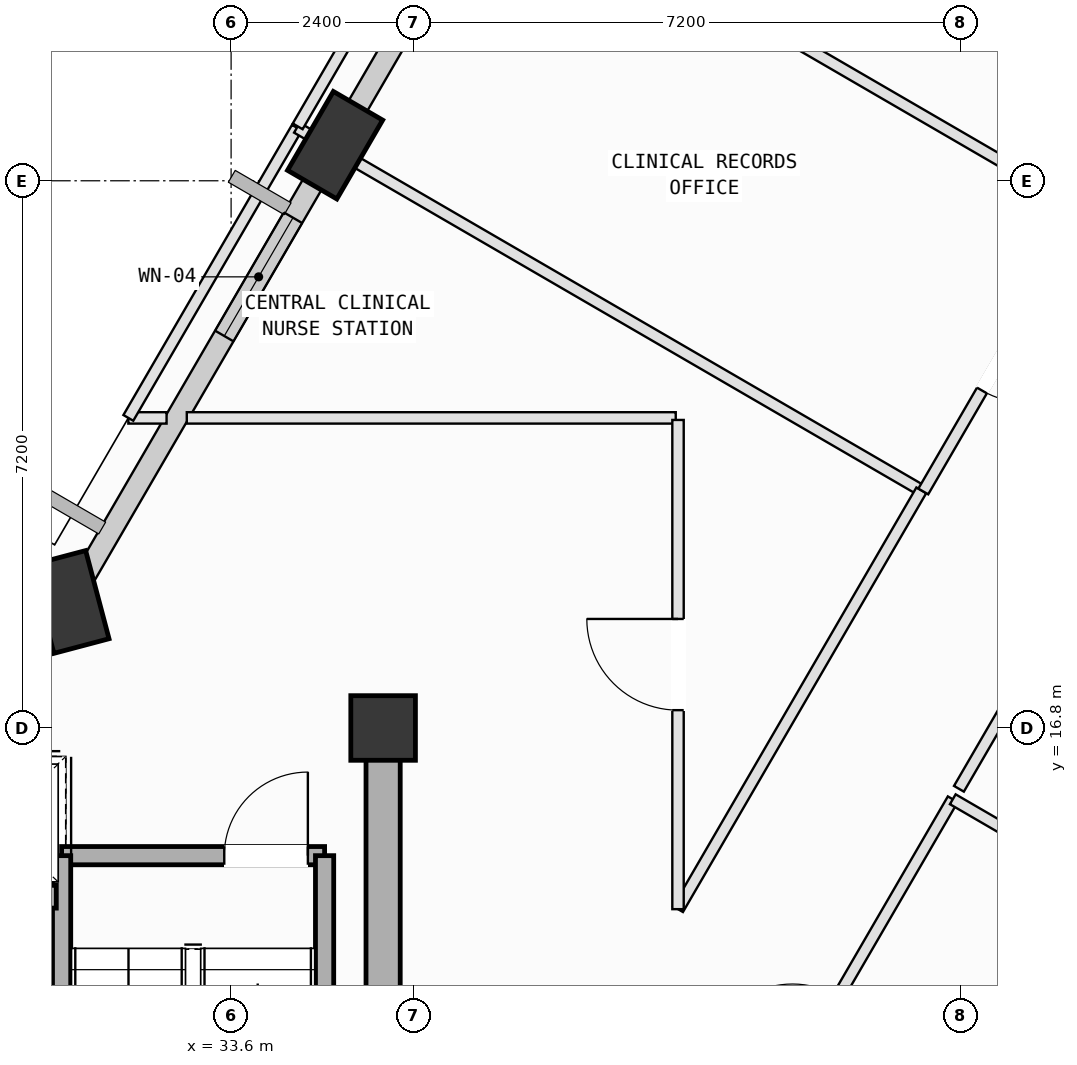
"""IFC4 building model, lengths in metres.
Left out: names, types, materials, properties, quantities, classifications, styles, units other than length and angle.
Written with IfcOpenShell. Run it as: python <this file> out.ifc"""

import sys

from ifc_helpers import new_model, si_unit, direction, frame, frame_2d, origin, origin_2d, place, context, subcontext, project, spatial, rectangle, extrude, element, fill, save


model = new_model("IFC4")
c1 = context("Model", 3, precision=1e-05, world=origin(), true_north=direction((0.0, 1.0)))
c2 = subcontext(c1, "Body", "Model", "MODEL_VIEW")
j1 = project(units=[si_unit("LENGTHUNIT", "METRE"), si_unit("PLANEANGLEUNIT", "RADIAN")], contexts=[c1])
p1 = place(None, origin())
s1 = spatial("IfcSite", under=j1, at=p1, CompositionType="ELEMENT")
p2 = place(p1, origin())
s2 = spatial("IfcBuilding", under=s1, at=p2, CompositionType="ELEMENT")
p3 = place(p2, frame((0.0, 0.0, 280.6)))
s3 = spatial("IfcBuildingStorey", under=s2, at=p3, CompositionType="ELEMENT", Elevation=280.6)
p4 = place(p3, frame((35.6, 16.8, 0.0), z_axis=(0.0, 0.0, 1.0), x_axis=(1.0, 0.0, 0.0)))
e1 = element("IfcColumn", 1, at=p4, inside=s3, PredefinedType="COLUMN", context=c2, shape_type="SweptSolid", body=[
    extrude(rectangle(XDim=0.85, YDim=0.85, at=origin_2d()), origin(), (0.0, 0.0, 1.0), 4.0),
])
p5 = place(p3, frame((34.968, 24.468, 0.002), z_axis=(0.001343981005, 0.005681374248, 0.999982957706), x_axis=(-0.687834203859, -0.725850275313, 0.005048349202)))
e2 = element("IfcColumn", 2, at=p5, inside=s3, PredefinedType="COLUMN", context=c2, shape_type="SweptSolid", body=[
    extrude(rectangle(XDim=1.2, YDim=0.75, at=origin_2d()), origin(), (0.0, 0.0, 1.0), 3.996),
])
p6 = place(p3, frame((31.478, 18.458, 0.002), z_axis=(0.026381199272, -0.008549462727, 0.999615395546), x_axis=(-0.99817719422, 0.0540716482, 0.026805704603)))
e3 = element("IfcColumn", 3, at=p6, inside=s3, PredefinedType="COLUMN", context=c2, shape_type="SweptSolid", body=[
    extrude(rectangle(XDim=1.2, YDim=0.75, at=origin_2d()), origin(), (0.0, 0.0, 1.0), 3.998),
])
p7 = place(p3, frame((35.174, 24.821, 0.0), z_axis=(0.0, 0.0, 1.0), x_axis=(0.502271513322, 0.864709966928, 0.0)))
e4 = element("IfcWall", 4, at=p7, inside=s3, PredefinedType="SOLIDWALL", context=c2, shape_type="SweptSolid", body=[
    extrude(rectangle(XDim=6.409, YDim=0.28, at=frame_2d((3.205, 0.0))), origin(), (0.0, 0.0, 1.0), 3.265),
])
p8 = place(p7, frame((1.101, 0.0, 0.75)))
e5 = element("IfcOpeningElement", 5, at=p8, cuts=e4, PredefinedType="OPENING", context=c2, shape_type="SweptSolid", body=[
    extrude(rectangle(XDim=1.4, YDim=1.85, at=frame_2d((0.7, 0.925))), frame((0.0, 0.15, 0.0), z_axis=(0.0, -1.0, 0.0), x_axis=(1.0, 0.0, 0.0)), (0.0, 0.0, 1.0), 0.3),
])
p9 = place(p3, frame((31.681, 18.809, 0.0), z_axis=(0.0, 0.0, 1.0), x_axis=(0.50225314976, 0.864720633243, 0.0)))
e6 = element("IfcWall", 6, at=p9, inside=s3, PredefinedType="SOLIDWALL", context=c2, shape_type="SweptSolid", body=[
    extrude(rectangle(XDim=6.158, YDim=0.28, at=frame_2d((3.079, 0.0))), origin(), (0.0, 0.0, 1.0), 3.265),
])
p10 = place(p9, frame((3.642, 0.0, 0.75)))
e7 = element("IfcOpeningElement", 7, at=p10, cuts=e6, PredefinedType="OPENING", context=c2, shape_type="SweptSolid", body=[
    extrude(rectangle(XDim=1.8, YDim=2.05, at=frame_2d((0.9, 1.025))), frame((0.0, 0.15, 0.0), z_axis=(0.0, -1.0, 0.0), x_axis=(1.0, 0.0, 0.0)), (0.0, 0.0, 1.0), 0.3),
])
p11 = place(p3, frame((25.164, 22.125, 0.0), z_axis=(0.0, 0.0, 1.0), x_axis=(0.864712756105, -0.502266711448, 0.0)))
e8 = element("IfcWall", 8, at=p11, inside=s3, PredefinedType="SOLIDWALL", context=c2, shape_type="SweptSolid", body=[
    extrude(rectangle(XDim=6.958, YDim=0.28, at=frame_2d((3.479, 0.0))), origin(), (0.0, 0.0, 1.0), 3.165),
])
p12 = place(p3, frame((31.37, 15.12, 0.0), z_axis=(0.0, 0.0, 1.0), x_axis=(1.0, 0.0, 0.0)))
e9 = element("IfcWall", 9, at=p12, inside=s3, PredefinedType="SOLIDWALL", context=c2, shape_type="SweptSolid", body=[
    extrude(rectangle(XDim=3.46, YDim=0.24, at=frame_2d((1.73, 0.0))), origin(), (0.0, 0.0, 1.0), 3.78),
])
p13 = place(p12, frame((2.14, 0.0, 0.0)))
e10 = element("IfcOpeningElement", 10, at=p13, cuts=e9, PredefinedType="OPENING", context=c2, shape_type="SweptSolid", body=[
    extrude(rectangle(XDim=1.1, YDim=2.15, at=frame_2d((0.55, 1.075))), frame((0.0, 0.13, 0.0), z_axis=(0.0, -1.0, 0.0), x_axis=(1.0, 0.0, 0.0)), (0.0, 0.0, 1.0), 0.26),
])
for number, where, z_axis, x_axis in (
    (11, (34.83, 15.12, 0.0), (0.0, 0.0, 1.0), (0.0, -1.0, 0.0)),
    (12, (31.37, 8.025, 0.0), (0.0, 0.0, 1.0), (0.0, 1.0, 0.0)),
):
    element("IfcWall", number, at=place(p3, frame(where, z_axis=z_axis, x_axis=x_axis)), inside=s3, PredefinedType="SOLIDWALL", context=c2, shape_type="SweptSolid", body=[
        extrude(rectangle(XDim=7.095, YDim=0.24, at=frame_2d((3.548, 0.0))), origin(), (0.0, 0.0, 1.0), 3.78),
    ])
p14 = place(p3, frame((35.6, 7.8, 0.0), z_axis=(0.0, 0.0, 1.0), x_axis=(0.0, 1.0, 0.0)))
e13 = element("IfcWall", 13, at=p14, inside=s3, PredefinedType="SHEAR", context=c2, shape_type="SweptSolid", body=[
    extrude(rectangle(XDim=9.0, YDim=0.45, at=frame_2d((4.5, 0.0))), origin(), (0.0, 0.0, 1.0), 3.78),
])
p15 = place(p3, frame((29.6, 14.58, 0.0), z_axis=(0.0, 0.0, 1.0), x_axis=(1.0, 0.0, 0.0)))
e14 = element("IfcWall", 14, at=p15, inside=s3, PredefinedType="SOLIDWALL", context=c2, shape_type="SweptSolid", body=[
    extrude(rectangle(XDim=1.7, YDim=0.3, at=frame_2d((0.85, 0.0))), origin(), (0.0, 0.0, 1.0), 3.78),
])
p16 = place(p15, frame((0.34, 0.0, 0.0)))
e15 = element("IfcOpeningElement", 15, at=p16, cuts=e14, PredefinedType="OPENING", context=c2, shape_type="SweptSolid", body=[
    extrude(rectangle(XDim=1.12, YDim=2.15, at=frame_2d((0.56, 1.075))), frame((0.0, 0.16, 0.0), z_axis=(0.0, -1.0, 0.0), x_axis=(1.0, 0.0, 0.0)), (0.0, 0.0, 1.0), 0.32),
])
p17 = place(p3, frame((39.48, 9.638, 0.0), z_axis=(0.0, 0.0, 1.0), x_axis=(0.502237798626, 0.864729549415, 0.0)))
e16 = element("IfcWall", 16, at=p17, inside=s3, PredefinedType="PARTITIONING", context=c2, shape_type="SweptSolid", body=[
    extrude(rectangle(XDim=7.198, YDim=0.15, at=frame_2d((3.599, 0.0))), origin(), (0.0, 0.0, 1.0), 3.78),
])
p18 = place(p17, frame((2.999, 0.0, 0.0)))
e17 = element("IfcOpeningElement", 17, at=p18, cuts=e16, PredefinedType="OPENING", context=c2, shape_type="SweptSolid", body=[
    extrude(rectangle(XDim=1.2, YDim=2.15, at=frame_2d((0.6, 1.075))), frame((0.0, 0.085, 0.0), z_axis=(0.0, -1.0, 0.0), x_axis=(1.0, 0.0, 0.0)), (0.0, 0.0, 1.0), 0.17),
])
p19 = place(p3, frame((43.095, 15.862, 0.0), z_axis=(0.0, 0.0, 1.0), x_axis=(0.864729577588, -0.502237750119, 0.0)))
e18 = element("IfcWall", 18, at=p19, inside=s3, PredefinedType="PARTITIONING", context=c2, shape_type="SweptSolid", body=[
    extrude(rectangle(XDim=9.448, YDim=0.15, at=frame_2d((4.724, 0.0))), origin(), (0.0, 0.0, 1.0), 3.78),
])
p20 = place(p3, frame((43.176, 16.0, 0.0), z_axis=(0.0, 0.0, 1.0), x_axis=(0.502223094905, 0.864738089218, 0.0)))
e19 = element("IfcWall", 19, at=p20, inside=s3, PredefinedType="PARTITIONING", context=c2, shape_type="SweptSolid", body=[
    extrude(rectangle(XDim=12.24, YDim=0.15, at=frame_2d((6.12, 0.0))), origin(), (0.0, 0.0, 1.0), 3.415),
])
p21 = place(p20, frame((5.52, 0.0, 0.0)))
e20 = element("IfcOpeningElement", 20, at=p21, cuts=e19, PredefinedType="OPENING", context=c2, shape_type="SweptSolid", body=[
    extrude(rectangle(XDim=1.2, YDim=2.15, at=frame_2d((0.6, 1.075))), frame((0.0, 0.085, 0.0), z_axis=(0.0, -1.0, 0.0), x_axis=(1.0, 0.0, 0.0)), (0.0, 0.0, 1.0), 0.17),
])
p22 = place(p3, frame((39.45, 20.88, 0.0), z_axis=(0.0, 0.0, 1.0), x_axis=(-1.0, 0.0, 0.0)))
e21 = element("IfcWall", 21, at=p22, inside=s3, PredefinedType="PARTITIONING", context=c2, shape_type="SweptSolid", body=[
    extrude(rectangle(XDim=6.433, YDim=0.15, at=frame_2d((3.216, 0.0))), origin(), (0.0, 0.0, 1.0), 3.415),
])
p23 = place(p3, frame((32.751, 20.88, 0.0), z_axis=(0.0, 0.0, 1.0), x_axis=(-1.0, 0.0, 0.0)))
e22 = element("IfcWall", 22, at=p23, inside=s3, PredefinedType="PARTITIONING", context=c2, shape_type="SweptSolid", body=[
    extrude(rectangle(XDim=0.503, YDim=0.15, at=frame_2d((0.251, 0.0))), origin(), (0.0, 0.0, 1.0), 3.78),
])
p24 = place(p3, frame((32.248, 20.88, 0.0), z_axis=(0.0, 0.0, 1.0), x_axis=(0.502312909272, 0.864685920539, 0.0)))
e23 = element("IfcWall", 23, at=p24, inside=s3, PredefinedType="PARTITIONING", context=c2, shape_type="SweptSolid", body=[
    extrude(rectangle(XDim=4.416, YDim=0.15, at=frame_2d((2.208, 0.0))), origin(), (0.0, 0.0, 1.0), 3.78),
])
p25 = place(p3, frame((34.466, 24.698, 0.0), z_axis=(0.0, 0.0, 1.0), x_axis=(0.864739263201, -0.50222107351, 0.0)))
e24 = element("IfcWall", 24, at=p25, inside=s3, PredefinedType="PARTITIONING", context=c2, shape_type="SweptSolid", body=[
    extrude(rectangle(XDim=9.5, YDim=0.15, at=frame_2d((4.75, 0.0))), origin(), (0.0, 0.0, 1.0), 3.78),
])
p26 = place(p3, frame((42.681, 19.927, 0.0), z_axis=(0.0, 0.0, 1.0), x_axis=(-0.502252880546, -0.86472078961, 0.0)))
e25 = element("IfcWall", 25, at=p26, inside=s3, PredefinedType="PARTITIONING", context=c2, shape_type="SweptSolid", body=[
    extrude(rectangle(XDim=6.373, YDim=0.15, at=frame_2d((3.187, 0.0))), origin(), (0.0, 0.0, 1.0), 3.78),
])
p27 = place(p3, frame((39.48, 14.416, 0.0), z_axis=(0.0, 0.0, 1.0), x_axis=(0.0, 1.0, 0.0)))
e26 = element("IfcWall", 26, at=p27, inside=s3, PredefinedType="PARTITIONING", context=c2, shape_type="SweptSolid", body=[
    extrude(rectangle(XDim=6.437, YDim=0.15, at=frame_2d((3.219, 0.0))), origin(), (0.0, 0.0, 1.0), 3.78),
])
p28 = place(p27, frame((2.618, 0.0, 0.0)))
e27 = element("IfcOpeningElement", 27, at=p28, cuts=e26, PredefinedType="OPENING", context=c2, shape_type="SweptSolid", body=[
    extrude(rectangle(XDim=1.2, YDim=2.15, at=frame_2d((0.6, 1.075))), frame((0.0, 0.085, 0.0), z_axis=(0.0, -1.0, 0.0), x_axis=(1.0, 0.0, 0.0)), (0.0, 0.0, 1.0), 0.17),
])
p29 = place(p3, frame((37.187, 28.059, 0.0), z_axis=(0.0, 0.0, 1.0), x_axis=(0.864744193966, -0.502212583477, 0.0)))
e28 = element("IfcWall", 28, at=p29, inside=s3, PredefinedType="PARTITIONING", context=c2, shape_type="SweptSolid", body=[
    extrude(rectangle(XDim=8.865, YDim=0.15, at=frame_2d((4.433, 0.0))), origin(), (0.0, 0.0, 1.0), 3.78),
])
p30 = place(p3, frame((44.853, 23.607, 0.0), z_axis=(0.0, 0.0, 1.0), x_axis=(-0.502243030772, -0.864726510546, 0.0)))
e29 = element("IfcWall", 29, at=p30, inside=s3, PredefinedType="PARTITIONING", context=c2, shape_type="SweptSolid", body=[
    extrude(rectangle(XDim=4.273, YDim=0.15, at=frame_2d((2.136, 0.0))), origin(), (0.0, 0.0, 1.0), 3.78),
])
p31 = place(p30, frame((1.537, 0.0, 0.0)))
e30 = element("IfcOpeningElement", 30, at=p31, cuts=e29, PredefinedType="OPENING", context=c2, shape_type="SweptSolid", body=[
    extrude(rectangle(XDim=1.2, YDim=2.15, at=frame_2d((0.6, 1.075))), frame((0.0, 0.085, 0.0), z_axis=(0.0, -1.0, 0.0), x_axis=(1.0, 0.0, 0.0)), (0.0, 0.0, 1.0), 0.17),
])
p32 = place(p3, frame((34.476, 24.716, 0.0), z_axis=(0.0, 0.0, 1.0), x_axis=(0.502303099222, 0.864691619314, 0.0)))
e31 = element("IfcWall", 31, at=p32, inside=s3, PredefinedType="PARTITIONING", context=c2, shape_type="SweptSolid", body=[
    extrude(rectangle(XDim=4.252, YDim=0.15, at=frame_2d((2.126, 0.0))), origin(), (0.0, 0.0, 1.0), 3.78),
])
p33 = place(p10, origin())
e32 = element("IfcWindow", 32, at=p33, inside=s3, PartitioningType="SINGLE_PANEL", PredefinedType="WINDOW", context=c2, shape_type="SweptSolid", body=[
    extrude(rectangle(XDim=1.8, YDim=2.05, at=frame_2d((0.9, 1.025))), frame((0.0, 0.03, 0.0), z_axis=(0.0, -1.0, 0.0), x_axis=(1.0, 0.0, 0.0)), (0.0, 0.0, 1.0), 0.06),
])
fill(e7, e32)
p34 = place(p13, origin())
e33 = element("IfcDoor", 33, at=p34, inside=s3, OperationType="SINGLE_SWING_RIGHT", PredefinedType="DOOR", context=c2, shape_type="SweptSolid", body=[
    extrude(rectangle(XDim=1.1, YDim=2.15, at=frame_2d((0.55, 1.075))), frame((0.0, 0.025, 0.0), z_axis=(0.0, -1.0, 0.0), x_axis=(1.0, 0.0, 0.0)), (0.0, 0.0, 1.0), 0.05),
])
fill(e10, e33)
p35 = place(p28, origin())
e34 = element("IfcDoor", 34, at=p35, inside=s3, OperationType="SINGLE_SWING_RIGHT", PredefinedType="DOOR", context=c2, shape_type="SweptSolid", body=[
    extrude(rectangle(XDim=1.2, YDim=2.15, at=frame_2d((0.6, 1.075))), frame((0.0, 0.025, 0.0), z_axis=(0.0, -1.0, 0.0), x_axis=(1.0, 0.0, 0.0)), (0.0, 0.0, 1.0), 0.05),
])
fill(e27, e34)
p36 = place(p31, origin())
e35 = element("IfcDoor", 35, at=p36, inside=s3, OperationType="SINGLE_SWING_LEFT", PredefinedType="DOOR", context=c2, shape_type="SweptSolid", body=[
    extrude(rectangle(XDim=1.2, YDim=2.15, at=frame_2d((0.6, 1.075))), frame((0.0, 0.025, 0.0), z_axis=(0.0, -1.0, 0.0), x_axis=(1.0, 0.0, 0.0)), (0.0, 0.0, 1.0), 0.05),
])
fill(e30, e35)
save(model, sys.argv[1])
